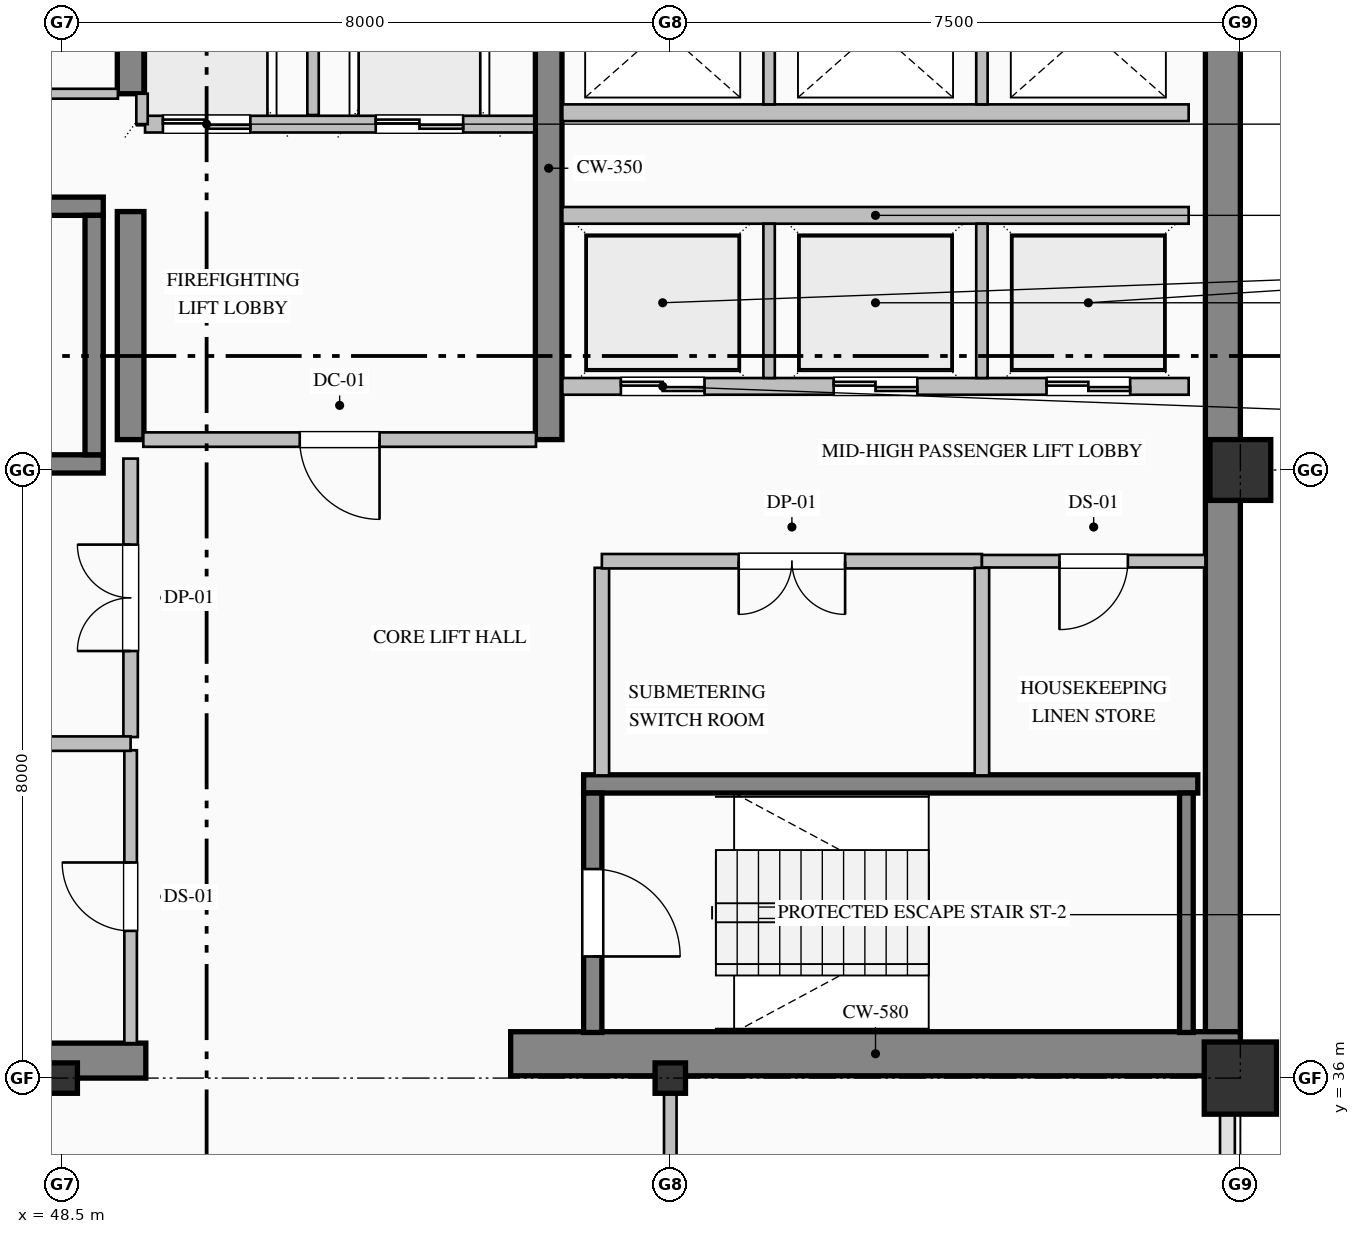
"""IFC4 building model, lengths in metres.
Left out: names, types, materials, properties, quantities, classifications, styles, units other than length and angle.
Written with IfcOpenShell. Run it as: python <this file> out.ifc"""

import sys

from ifc_helpers import new_model, si_unit, direction, frame, frame_2d, origin, origin_2d, place, context, subcontext, project, spatial, rectangle, hollow_rectangle, i_section, extrude, element, fill, save


model = new_model("IFC4")
c1 = context("Model", 3, precision=1e-05, world=origin(), true_north=direction((0.0, 1.0)))
c2 = subcontext(c1, "Body", "Model", "MODEL_VIEW")
j1 = project(units=[si_unit("LENGTHUNIT", "METRE"), si_unit("PLANEANGLEUNIT", "RADIAN")], contexts=[c1])
p1 = place(None, origin())
s1 = spatial("IfcSite", under=j1, at=p1, CompositionType="ELEMENT")
p2 = place(p1, origin())
s2 = spatial("IfcBuilding", under=s1, at=p2, CompositionType="ELEMENT")
p3 = place(p2, frame((0.0, 0.0, 213.8)))
s3 = spatial("IfcBuildingStorey", under=s2, at=p3, CompositionType="ELEMENT", Elevation=213.8)
p4 = place(p3, frame((63.77, 36.32, 0.0), z_axis=(0.0, 0.0, 1.0), x_axis=(0.0, 1.0, 0.0)))
e1 = element("IfcWall", 1, at=p4, inside=s3, PredefinedType="SHEAR", context=c2, shape_type="SweptSolid", body=[
    extrude(rectangle(XDim=15.22, YDim=0.46, at=frame_2d((7.61, 0.0))), origin(), (0.0, 0.0, 1.0), 3.775),
])
p5 = place(p3, frame((40.5, 36.23, 0.0), z_axis=(0.0, 0.0, 1.0), x_axis=(1.0, 0.0, 0.0)))
e2 = element("IfcWall", 2, at=p5, inside=s3, PredefinedType="SHEAR", context=c2, shape_type="SweptSolid", body=[
    extrude(rectangle(XDim=9.1, YDim=0.46, at=frame_2d((4.55, 0.0))), origin(), (0.0, 0.0, 1.0), 3.775),
])
p6 = place(p3, frame((54.4, 36.32, 0.0), z_axis=(0.0, 0.0, 1.0), x_axis=(1.0, 0.0, 0.0)))
e3 = element("IfcWall", 3, at=p6, inside=s3, PredefinedType="SHEAR", context=c2, shape_type="SweptSolid", body=[
    extrude(rectangle(XDim=9.6, YDim=0.58, at=frame_2d((4.8, 0.0))), origin(), (0.0, 0.0, 1.0), 4.0),
])
p7 = place(p3, frame((49.4, 44.4, 0.0), z_axis=(0.0, 0.0, 1.0), x_axis=(0.0, 1.0, 0.0)))
e4 = element("IfcWall", 4, at=p7, inside=s3, PredefinedType="SHEAR", context=c2, shape_type="SweptSolid", body=[
    extrude(rectangle(XDim=3.0, YDim=0.35, at=frame_2d((1.5, 0.0))), origin(), (0.0, 0.0, 1.0), 3.775),
])
p8 = place(p3, frame((49.4, 48.95, 0.0), z_axis=(0.0, 0.0, 1.0), x_axis=(0.0, 1.0, 0.0)))
e5 = element("IfcWall", 5, at=p8, inside=s3, PredefinedType="SHEAR", context=c2, shape_type="SweptSolid", body=[
    extrude(rectangle(XDim=2.59, YDim=0.35, at=frame_2d((1.295, 0.0))), origin(), (0.0, 0.0, 1.0), 3.775),
])
p9 = place(p3, frame((54.9, 44.4, 0.0), z_axis=(0.0, 0.0, 1.0), x_axis=(0.0, 1.0, 0.0)))
e6 = element("IfcWall", 6, at=p9, inside=s3, PredefinedType="SHEAR", context=c2, shape_type="SweptSolid", body=[
    extrude(rectangle(XDim=7.14, YDim=0.35, at=frame_2d((3.57, 0.0))), origin(), (0.0, 0.0, 1.0), 3.775),
])
for number, where, z_axis, x_axis in (
    (7, (48.5, 36.0, 0.0), (0.0, 0.0, 1.0), (1.0, 0.0, 0.0)),
    (8, (56.5, 36.0, 0.0), (0.0, 0.0, 1.0), (1.0, 0.0, 0.0)),
):
    element("IfcColumn", number, at=place(p3, frame(where, z_axis=z_axis, x_axis=x_axis)), inside=s3, PredefinedType="COLUMN", context=c2, shape_type="SweptSolid", body=[
        extrude(i_section(OverallWidth=0.4, OverallDepth=0.4, WebThickness=0.013, FlangeThickness=0.021, FilletRadius=0.022, at=origin_2d()), origin(), (0.0, 0.0, 1.0), 4.0),
    ])
p10 = place(p3, frame((64.0, 36.0, 0.0), z_axis=(0.0, 0.0, 1.0), x_axis=(1.0, 0.0, 0.0)))
e9 = element("IfcColumn", 9, at=p10, inside=s3, PredefinedType="COLUMN", context=c2, shape_type="SweptSolid", body=[
    extrude(hollow_rectangle(XDim=0.95, YDim=0.95, WallThickness=0.036, at=origin_2d()), origin(), (0.0, 0.0, 1.0), 4.0),
])
p11 = place(p3, frame((64.0, 44.0, 0.0), z_axis=(0.0, 0.0, 1.0), x_axis=(1.0, 0.0, 0.0)))
e10 = element("IfcColumn", 10, at=p11, inside=s3, PredefinedType="COLUMN", context=c2, shape_type="SweptSolid", body=[
    extrude(hollow_rectangle(XDim=0.8, YDim=0.8, WallThickness=0.032, at=origin_2d()), origin(), (0.0, 0.0, 1.0), 4.0),
])
for number, where, z_axis, x_axis in (
    (11, (40.96, 47.47, 0.0), (0.0, 0.0, 1.0), (1.0, 0.0, 0.0)),
    (12, (49.04, 44.08, 0.0), (0.0, 0.0, 1.0), (-1.0, 0.0, 0.0)),
):
    element("IfcWall", number, at=place(p3, frame(where, z_axis=z_axis, x_axis=x_axis)), inside=s3, PredefinedType="SOLIDWALL", context=c2, shape_type="SweptSolid", body=[
        extrude(rectangle(XDim=8.08, YDim=0.24, at=frame_2d((4.04, 0.0))), origin(), (0.0, 0.0, 1.0), 4.0),
    ])
p12 = place(p3, frame((48.92, 44.2, 0.0), z_axis=(0.0, 0.0, 1.0), x_axis=(0.0, 1.0, 0.0)))
e13 = element("IfcWall", 13, at=p12, inside=s3, PredefinedType="SOLIDWALL", context=c2, shape_type="SweptSolid", body=[
    extrude(rectangle(XDim=3.15, YDim=0.24, at=frame_2d((1.575, 0.0))), origin(), (0.0, 0.0, 1.0), 4.0),
])
p13 = place(p3, frame((55.36, 39.87, 0.0), z_axis=(0.0, 0.0, 1.0), x_axis=(1.0, 0.0, 0.0)))
e14 = element("IfcWall", 14, at=p13, inside=s3, PredefinedType="SOLIDWALL", context=c2, shape_type="SweptSolid", body=[
    extrude(rectangle(XDim=8.08, YDim=0.24, at=frame_2d((4.04, 0.0))), origin(), (0.0, 0.0, 1.0), 4.0),
])
p14 = place(p3, frame((55.48, 39.75, 0.0), z_axis=(0.0, 0.0, 1.0), x_axis=(0.0, -1.0, 0.0)))
e15 = element("IfcWall", 15, at=p14, inside=s3, PredefinedType="SOLIDWALL", context=c2, shape_type="SweptSolid", body=[
    extrude(rectangle(XDim=3.15, YDim=0.24, at=frame_2d((1.575, 0.0))), origin(), (0.0, 0.0, 1.0), 4.0),
])
p15 = place(p14, frame((1.0, 0.0, 0.0)))
e16 = element("IfcOpeningElement", 16, at=p15, cuts=e15, PredefinedType="OPENING", context=c2, shape_type="SweptSolid", body=[
    extrude(rectangle(XDim=1.15, YDim=2.2, at=frame_2d((0.575, 1.1))), frame((0.0, 0.13, 0.0), z_axis=(0.0, -1.0, 0.0), x_axis=(1.0, 0.0, 0.0)), (0.0, 0.0, 1.0), 0.26),
])
p16 = place(p3, frame((63.29, 36.6, 0.0), z_axis=(0.0, 0.0, 1.0), x_axis=(0.0, 1.0, 0.0)))
e17 = element("IfcWall", 17, at=p16, inside=s3, PredefinedType="SOLIDWALL", context=c2, shape_type="SweptSolid", body=[
    extrude(rectangle(XDim=3.15, YDim=0.18, at=frame_2d((1.575, 0.0))), origin(), (0.0, 0.0, 1.0), 4.0),
])
p17 = place(p3, frame((54.71, 48.55, 0.0), z_axis=(0.0, 0.0, 1.0), x_axis=(-1.0, 0.0, 0.0)))
e18 = element("IfcWall", 18, at=p17, inside=s3, PredefinedType="PARTITIONING", context=c2, shape_type="SweptSolid", body=[
    extrude(rectangle(XDim=5.12, YDim=0.22, at=frame_2d((2.56, 0.0))), origin(), (0.0, 0.0, 1.0), 3.775),
])
p18 = place(p17, frame((3.735, 0.0, 0.0)))
e19 = element("IfcOpeningElement", 19, at=p18, cuts=e18, PredefinedType="OPENING", context=c2, shape_type="SweptSolid", body=[
    extrude(rectangle(XDim=1.15, YDim=2.2, at=frame_2d((0.575, 1.1))), frame((0.0, 0.12, 0.0), z_axis=(0.0, -1.0, 0.0), x_axis=(1.0, 0.0, 0.0)), (0.0, 0.0, 1.0), 0.24),
])
p19 = place(p17, frame((0.935, 0.0, 0.0)))
e20 = element("IfcOpeningElement", 20, at=p19, cuts=e18, PredefinedType="OPENING", context=c2, shape_type="SweptSolid", body=[
    extrude(rectangle(XDim=1.15, YDim=2.2, at=frame_2d((0.575, 1.1))), frame((0.0, 0.12, 0.0), z_axis=(0.0, -1.0, 0.0), x_axis=(1.0, 0.0, 0.0)), (0.0, 0.0, 1.0), 0.24),
])
p20 = place(p3, frame((51.8, 48.67, 0.0), z_axis=(0.0, 0.0, 1.0), x_axis=(0.0, 1.0, 0.0)))
e21 = element("IfcWall", 21, at=p20, inside=s3, PredefinedType="PARTITIONING", context=c2, shape_type="SweptSolid", body=[
    extrude(rectangle(XDim=2.87, YDim=0.15, at=frame_2d((1.435, 0.0))), origin(), (0.0, 0.0, 1.0), 3.775),
])
p21 = place(p3, frame((49.55, 48.55, 0.0), z_axis=(0.0, 0.0, 1.0), x_axis=(0.0, 1.0, 0.0)))
e22 = element("IfcWall", 22, at=p21, inside=s3, PredefinedType="PARTITIONING", context=c2, shape_type="SweptSolid", body=[
    extrude(rectangle(XDim=0.4, YDim=0.15, at=frame_2d((0.2, 0.0))), origin(), (0.0, 0.0, 1.0), 3.775),
])
p22 = place(p3, frame((63.32, 45.1, 0.0), z_axis=(0.0, 0.0, 1.0), x_axis=(-1.0, 0.0, 0.0)))
e23 = element("IfcWall", 23, at=p22, inside=s3, PredefinedType="PARTITIONING", context=c2, shape_type="SweptSolid", body=[
    extrude(rectangle(XDim=8.24, YDim=0.22, at=frame_2d((4.12, 0.0))), origin(), (0.0, 0.0, 1.0), 3.775),
])
p23 = place(p22, frame((6.37, 0.0, 0.0)))
e24 = element("IfcOpeningElement", 24, at=p23, cuts=e23, PredefinedType="OPENING", context=c2, shape_type="SweptSolid", body=[
    extrude(rectangle(XDim=1.1, YDim=2.2, at=frame_2d((0.55, 1.1))), frame((0.0, 0.12, 0.0), z_axis=(0.0, -1.0, 0.0), x_axis=(1.0, 0.0, 0.0)), (0.0, 0.0, 1.0), 0.24),
])
p24 = place(p22, frame((3.57, 0.0, 0.0)))
e25 = element("IfcOpeningElement", 25, at=p24, cuts=e23, PredefinedType="OPENING", context=c2, shape_type="SweptSolid", body=[
    extrude(rectangle(XDim=1.1, YDim=2.2, at=frame_2d((0.55, 1.1))), frame((0.0, 0.12, 0.0), z_axis=(0.0, -1.0, 0.0), x_axis=(1.0, 0.0, 0.0)), (0.0, 0.0, 1.0), 0.24),
])
p25 = place(p22, frame((0.77, 0.0, 0.0)))
e26 = element("IfcOpeningElement", 26, at=p25, cuts=e23, PredefinedType="OPENING", context=c2, shape_type="SweptSolid", body=[
    extrude(rectangle(XDim=1.1, YDim=2.2, at=frame_2d((0.55, 1.1))), frame((0.0, 0.12, 0.0), z_axis=(0.0, -1.0, 0.0), x_axis=(1.0, 0.0, 0.0)), (0.0, 0.0, 1.0), 0.24),
])
p26 = place(p3, frame((55.08, 47.35, 0.0), z_axis=(0.0, 0.0, 1.0), x_axis=(1.0, 0.0, 0.0)))
e27 = element("IfcWall", 27, at=p26, inside=s3, PredefinedType="PARTITIONING", context=c2, shape_type="SweptSolid", body=[
    extrude(rectangle(XDim=8.24, YDim=0.22, at=frame_2d((4.12, 0.0))), origin(), (0.0, 0.0, 1.0), 3.775),
])
for number, where, z_axis, x_axis in (
    (28, (57.8, 45.21, 0.0), (0.0, 0.0, 1.0), (0.0, 1.0, 0.0)),
    (29, (60.6, 45.21, 0.0), (0.0, 0.0, 1.0), (0.0, 1.0, 0.0)),
):
    element("IfcWall", number, at=place(p3, frame(where, z_axis=z_axis, x_axis=x_axis)), inside=s3, PredefinedType="PARTITIONING", context=c2, shape_type="SweptSolid", body=[
        extrude(rectangle(XDim=2.03, YDim=0.15, at=frame_2d((1.015, 0.0))), origin(), (0.0, 0.0, 1.0), 3.775),
    ])
p27 = place(p3, frame((63.32, 48.7, 0.0), z_axis=(0.0, 0.0, 1.0), x_axis=(-1.0, 0.0, 0.0)))
e30 = element("IfcWall", 30, at=p27, inside=s3, PredefinedType="PARTITIONING", context=c2, shape_type="SweptSolid", body=[
    extrude(rectangle(XDim=8.24, YDim=0.22, at=frame_2d((4.12, 0.0))), origin(), (0.0, 0.0, 1.0), 3.775),
])
for number, where, z_axis, x_axis in (
    (31, (57.8, 48.81, 0.0), (0.0, 0.0, 1.0), (0.0, 1.0, 0.0)),
    (32, (60.6, 48.81, 0.0), (0.0, 0.0, 1.0), (0.0, 1.0, 0.0)),
):
    element("IfcWall", number, at=place(p3, frame(where, z_axis=z_axis, x_axis=x_axis)), inside=s3, PredefinedType="PARTITIONING", context=c2, shape_type="SweptSolid", body=[
        extrude(rectangle(XDim=2.73, YDim=0.15, at=frame_2d((1.365, 0.0))), origin(), (0.0, 0.0, 1.0), 3.775),
    ])
p28 = place(p3, frame((43.5, 48.95, 0.0), z_axis=(0.0, 0.0, 1.0), x_axis=(1.0, 0.0, 0.0)))
e33 = element("IfcWall", 33, at=p28, inside=s3, PredefinedType="PARTITIONING", context=c2, shape_type="SweptSolid", body=[
    extrude(rectangle(XDim=5.733, YDim=0.13, at=frame_2d((2.866, 0.0))), origin(), (0.0, 0.0, 1.0), 3.775),
])
p29 = place(p28, frame((2.406, 0.0, 0.0)))
e34 = element("IfcOpeningElement", 34, at=p29, cuts=e33, PredefinedType="OPENING", context=c2, shape_type="SweptSolid", body=[
    extrude(rectangle(XDim=0.92, YDim=2.15, at=frame_2d((0.46, 1.075))), frame((0.0, 0.075, 0.0), z_axis=(0.0, -1.0, 0.0), x_axis=(1.0, 0.0, 0.0)), (0.0, 0.0, 1.0), 0.15),
])
p30 = place(p3, frame((54.733, 44.4, 0.0), z_axis=(0.0, 0.0, 1.0), x_axis=(-1.0, 0.0, 0.0)))
e35 = element("IfcWall", 35, at=p30, inside=s3, PredefinedType="PARTITIONING", context=c2, shape_type="SweptSolid", body=[
    extrude(rectangle(XDim=5.166, YDim=0.19, at=frame_2d((2.583, 0.0))), origin(), (0.0, 0.0, 1.0), 3.775),
])
p31 = place(p30, frame((2.058, 0.0, 0.0)))
e36 = element("IfcOpeningElement", 36, at=p31, cuts=e35, PredefinedType="OPENING", context=c2, shape_type="SweptSolid", body=[
    extrude(rectangle(XDim=1.05, YDim=2.15, at=frame_2d((0.525, 1.075))), frame((0.0, 0.105, 0.0), z_axis=(0.0, -1.0, 0.0), x_axis=(1.0, 0.0, 0.0)), (0.0, 0.0, 1.0), 0.21),
])
p32 = place(p3, frame((49.4, 36.46, 0.0), z_axis=(0.0, 0.0, 1.0), x_axis=(0.0, 1.0, 0.0)))
e37 = element("IfcWall", 37, at=p32, inside=s3, PredefinedType="PARTITIONING", context=c2, shape_type="SweptSolid", body=[
    extrude(rectangle(XDim=3.853, YDim=0.165, at=frame_2d((1.927, 0.0))), origin(), (0.0, 0.0, 1.0), 3.017),
])
p33 = place(p32, frame((1.477, 0.0, 0.0)))
e38 = element("IfcOpeningElement", 38, at=p33, cuts=e37, PredefinedType="OPENING", context=c2, shape_type="SweptSolid", body=[
    extrude(rectangle(XDim=0.9, YDim=2.15, at=frame_2d((0.45, 1.075))), frame((0.0, 0.093, 0.0), z_axis=(0.0, -1.0, 0.0), x_axis=(1.0, 0.0, 0.0)), (0.0, 0.0, 1.0), 0.185),
])
p34 = place(p3, frame((49.4, 40.487, 0.0), z_axis=(0.0, 0.0, 1.0), x_axis=(0.0, 1.0, 0.0)))
e39 = element("IfcWall", 39, at=p34, inside=s3, PredefinedType="PARTITIONING", context=c2, shape_type="SweptSolid", body=[
    extrude(rectangle(XDim=3.663, YDim=0.19, at=frame_2d((1.832, 0.0))), origin(), (0.0, 0.0, 1.0), 3.017),
])
p35 = place(p34, frame((1.132, 0.0, 0.0)))
e40 = element("IfcOpeningElement", 40, at=p35, cuts=e39, PredefinedType="OPENING", context=c2, shape_type="SweptSolid", body=[
    extrude(rectangle(XDim=1.4, YDim=2.25, at=frame_2d((0.7, 1.125))), frame((0.0, 0.105, 0.0), z_axis=(0.0, -1.0, 0.0), x_axis=(1.0, 0.0, 0.0)), (0.0, 0.0, 1.0), 0.21),
])
p36 = place(p3, frame((55.6, 42.713, 0.0), z_axis=(0.0, 0.0, 1.0), x_axis=(0.0, -1.0, 0.0)))
e41 = element("IfcWall", 41, at=p36, inside=s3, PredefinedType="PARTITIONING", context=c2, shape_type="SweptSolid", body=[
    extrude(rectangle(XDim=2.731, YDim=0.19, at=frame_2d((1.365, 0.0))), origin(), (0.0, 0.0, 1.0), 3.775),
])
p37 = place(p3, frame((40.96, 40.4, 0.0), z_axis=(0.0, 0.0, 1.0), x_axis=(1.0, 0.0, 0.0)))
e42 = element("IfcWall", 42, at=p37, inside=s3, PredefinedType="PARTITIONING", context=c2, shape_type="SweptSolid", body=[
    extrude(rectangle(XDim=8.44, YDim=0.19, at=frame_2d((4.22, 0.0))), origin(), (0.0, 0.0, 1.0), 3.775),
])
p38 = place(p3, frame((60.6, 42.8, 0.0), z_axis=(0.0, 0.0, 1.0), x_axis=(-1.0, 0.0, 0.0)))
e43 = element("IfcWall", 43, at=p38, inside=s3, PredefinedType="PARTITIONING", context=c2, shape_type="SweptSolid", body=[
    extrude(rectangle(XDim=5.0, YDim=0.19, at=frame_2d((2.5, 0.0))), origin(), (0.0, 0.0, 1.0), 3.775),
])
p39 = place(p38, frame((1.8, 0.0, 0.0)))
e44 = element("IfcOpeningElement", 44, at=p39, cuts=e43, PredefinedType="OPENING", context=c2, shape_type="SweptSolid", body=[
    extrude(rectangle(XDim=1.4, YDim=2.25, at=frame_2d((0.7, 1.125))), frame((0.0, 0.105, 0.0), z_axis=(0.0, -1.0, 0.0), x_axis=(1.0, 0.0, 0.0)), (0.0, 0.0, 1.0), 0.21),
])
p40 = place(p3, frame((63.54, 42.8, 0.0), z_axis=(0.0, 0.0, 1.0), x_axis=(-1.0, 0.0, 0.0)))
e45 = element("IfcWall", 45, at=p40, inside=s3, PredefinedType="PARTITIONING", context=c2, shape_type="SweptSolid", body=[
    extrude(rectangle(XDim=2.94, YDim=0.165, at=frame_2d((1.47, 0.0))), origin(), (0.0, 0.0, 1.0), 3.775),
])
p41 = place(p40, frame((1.02, 0.0, 0.0)))
e46 = element("IfcOpeningElement", 46, at=p41, cuts=e45, PredefinedType="OPENING", context=c2, shape_type="SweptSolid", body=[
    extrude(rectangle(XDim=0.9, YDim=2.15, at=frame_2d((0.45, 1.075))), frame((0.0, 0.093, 0.0), z_axis=(0.0, -1.0, 0.0), x_axis=(1.0, 0.0, 0.0)), (0.0, 0.0, 1.0), 0.185),
])
p42 = place(p3, frame((60.6, 42.713, 0.0), z_axis=(0.0, 0.0, 1.0), x_axis=(0.0, -1.0, 0.0)))
e47 = element("IfcWall", 47, at=p42, inside=s3, PredefinedType="PARTITIONING", context=c2, shape_type="SweptSolid", body=[
    extrude(rectangle(XDim=2.731, YDim=0.19, at=frame_2d((1.365, 0.0))), origin(), (0.0, 0.0, 1.0), 3.775),
])
p43 = place(p3, frame((56.5, 36.0, 0.0), z_axis=(0.0, 0.0, 1.0), x_axis=(0.0, -1.0, 0.0)))
e48 = element("IfcWall", 48, at=p43, inside=s3, PredefinedType="PARTITIONING", context=c2, shape_type="SweptSolid", body=[
    extrude(rectangle(XDim=4.153, YDim=0.165, at=frame_2d((2.077, 0.0))), origin(), (0.0, 0.0, 1.0), 3.179),
])
p44 = place(p43, frame((1.576, 0.0, 0.0)))
e49 = element("IfcOpeningElement", 49, at=p44, cuts=e48, PredefinedType="OPENING", context=c2, shape_type="SweptSolid", body=[
    extrude(rectangle(XDim=1.0, YDim=2.15, at=frame_2d((0.5, 1.075))), frame((0.0, 0.093, 0.0), z_axis=(0.0, -1.0, 0.0), x_axis=(1.0, 0.0, 0.0)), (0.0, 0.0, 1.0), 0.185),
])
p45 = place(p15, origin())
e50 = element("IfcDoor", 50, at=p45, inside=s3, OperationType="SINGLE_SWING_RIGHT", PredefinedType="DOOR", context=c2, shape_type="SweptSolid", body=[
    extrude(rectangle(XDim=1.15, YDim=2.2, at=frame_2d((0.575, 1.1))), frame((0.0, 0.025, 0.0), z_axis=(0.0, -1.0, 0.0), x_axis=(1.0, 0.0, 0.0)), (0.0, 0.0, 1.0), 0.05),
])
fill(e16, e50)
p46 = place(p18, origin())
e51 = element("IfcDoor", 51, at=p46, inside=s3, OperationType="DOUBLE_DOOR_SLIDING", PredefinedType="DOOR", context=c2, shape_type="SweptSolid", body=[
    extrude(rectangle(XDim=1.15, YDim=2.2, at=frame_2d((0.575, 1.1))), frame((0.0, 0.025, 0.0), z_axis=(0.0, -1.0, 0.0), x_axis=(1.0, 0.0, 0.0)), (0.0, 0.0, 1.0), 0.05),
])
fill(e19, e51)
p47 = place(p19, origin())
e52 = element("IfcDoor", 52, at=p47, inside=s3, OperationType="DOUBLE_DOOR_SLIDING", PredefinedType="DOOR", context=c2, shape_type="SweptSolid", body=[
    extrude(rectangle(XDim=1.15, YDim=2.2, at=frame_2d((0.575, 1.1))), frame((0.0, 0.025, 0.0), z_axis=(0.0, -1.0, 0.0), x_axis=(1.0, 0.0, 0.0)), (0.0, 0.0, 1.0), 0.05),
])
fill(e20, e52)
p48 = place(p23, origin())
e53 = element("IfcDoor", 53, at=p48, inside=s3, OperationType="DOUBLE_DOOR_SLIDING", PredefinedType="DOOR", context=c2, shape_type="SweptSolid", body=[
    extrude(rectangle(XDim=1.1, YDim=2.2, at=frame_2d((0.55, 1.1))), frame((0.0, 0.025, 0.0), z_axis=(0.0, -1.0, 0.0), x_axis=(1.0, 0.0, 0.0)), (0.0, 0.0, 1.0), 0.05),
])
fill(e24, e53)
p49 = place(p24, origin())
e54 = element("IfcDoor", 54, at=p49, inside=s3, OperationType="DOUBLE_DOOR_SLIDING", PredefinedType="DOOR", context=c2, shape_type="SweptSolid", body=[
    extrude(rectangle(XDim=1.1, YDim=2.2, at=frame_2d((0.55, 1.1))), frame((0.0, 0.025, 0.0), z_axis=(0.0, -1.0, 0.0), x_axis=(1.0, 0.0, 0.0)), (0.0, 0.0, 1.0), 0.05),
])
fill(e25, e54)
p50 = place(p25, origin())
e55 = element("IfcDoor", 55, at=p50, inside=s3, OperationType="DOUBLE_DOOR_SLIDING", PredefinedType="DOOR", context=c2, shape_type="SweptSolid", body=[
    extrude(rectangle(XDim=1.1, YDim=2.2, at=frame_2d((0.55, 1.1))), frame((0.0, 0.025, 0.0), z_axis=(0.0, -1.0, 0.0), x_axis=(1.0, 0.0, 0.0)), (0.0, 0.0, 1.0), 0.05),
])
fill(e26, e55)
p51 = place(p31, origin())
e56 = element("IfcDoor", 56, at=p51, inside=s3, OperationType="SINGLE_SWING_LEFT", PredefinedType="DOOR", context=c2, shape_type="SweptSolid", body=[
    extrude(rectangle(XDim=1.05, YDim=2.15, at=frame_2d((0.525, 1.075))), frame((0.0, 0.025, 0.0), z_axis=(0.0, -1.0, 0.0), x_axis=(1.0, 0.0, 0.0)), (0.0, 0.0, 1.0), 0.05),
])
fill(e36, e56)
p52 = place(p33, origin())
e57 = element("IfcDoor", 57, at=p52, inside=s3, OperationType="SINGLE_SWING_RIGHT", PredefinedType="DOOR", context=c2, shape_type="SweptSolid", body=[
    extrude(rectangle(XDim=0.9, YDim=2.15, at=frame_2d((0.45, 1.075))), frame((0.0, 0.025, 0.0), z_axis=(0.0, -1.0, 0.0), x_axis=(1.0, 0.0, 0.0)), (0.0, 0.0, 1.0), 0.05),
])
fill(e38, e57)
p53 = place(p35, origin())
e58 = element("IfcDoor", 58, at=p53, inside=s3, OperationType="DOUBLE_DOOR_SINGLE_SWING", PredefinedType="DOOR", context=c2, shape_type="SweptSolid", body=[
    extrude(rectangle(XDim=1.4, YDim=2.25, at=frame_2d((0.7, 1.125))), frame((0.0, 0.025, 0.0), z_axis=(0.0, -1.0, 0.0), x_axis=(1.0, 0.0, 0.0)), (0.0, 0.0, 1.0), 0.05),
])
fill(e40, e58)
p54 = place(p39, origin())
e59 = element("IfcDoor", 59, at=p54, inside=s3, OperationType="DOUBLE_DOOR_SINGLE_SWING", PredefinedType="DOOR", context=c2, shape_type="SweptSolid", body=[
    extrude(rectangle(XDim=1.4, YDim=2.25, at=frame_2d((0.7, 1.125))), frame((0.0, 0.025, 0.0), z_axis=(0.0, -1.0, 0.0), x_axis=(1.0, 0.0, 0.0)), (0.0, 0.0, 1.0), 0.05),
])
fill(e44, e59)
p55 = place(p41, origin())
e60 = element("IfcDoor", 60, at=p55, inside=s3, OperationType="SINGLE_SWING_RIGHT", PredefinedType="DOOR", context=c2, shape_type="SweptSolid", body=[
    extrude(rectangle(XDim=0.9, YDim=2.15, at=frame_2d((0.45, 1.075))), frame((0.0, 0.025, 0.0), z_axis=(0.0, -1.0, 0.0), x_axis=(1.0, 0.0, 0.0)), (0.0, 0.0, 1.0), 0.05),
])
fill(e46, e60)
save(model, sys.argv[1])
